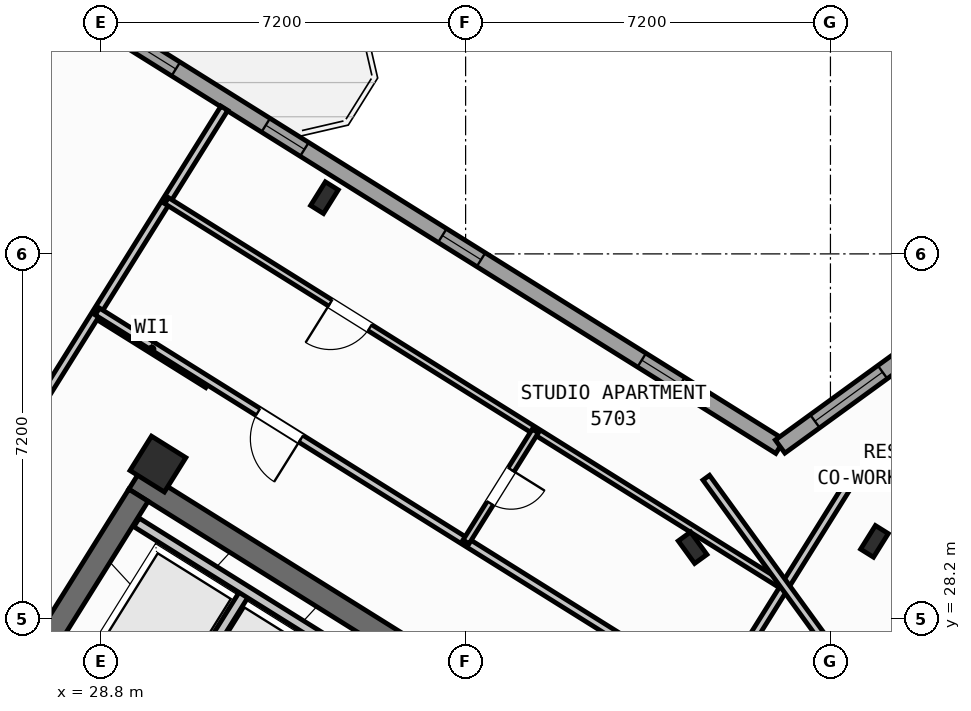
"""IFC4 building model, lengths in metres.
Left out: names, types, materials, properties, quantities, classifications, styles, units other than length and angle.
Written with IfcOpenShell. Run it as: python <this file> out.ifc"""

import sys

from ifc_helpers import new_model, si_unit, direction, frame, frame_2d, origin, origin_2d, place, context, subcontext, project, spatial, rectangle, hollow_rectangle, i_section, extrude, source, transform, mapped, element, fill, save


model = new_model("IFC4")
c1 = context("Model", 3, precision=1e-05, world=origin(), true_north=direction((0.0, 1.0)))
c2 = subcontext(c1, "Body", "Model", "MODEL_VIEW")
j1 = project(units=[si_unit("LENGTHUNIT", "METRE"), si_unit("PLANEANGLEUNIT", "RADIAN")], contexts=[c1])
p1 = place(None, origin())
s1 = spatial("IfcSite", under=j1, at=p1, CompositionType="ELEMENT")
p2 = place(p1, origin())
s2 = spatial("IfcBuilding", under=s1, at=p2, CompositionType="ELEMENT")
p3 = place(p2, frame((0.0, 0.0, 225.6)))
s3 = spatial("IfcBuildingStorey", under=s2, at=p3, CompositionType="ELEMENT", Elevation=225.6)
p4 = place(p3, frame((40.531, 24.036, 0.0), z_axis=(0.0, 0.0, 1.0), x_axis=(-0.848048787466, 0.529918157905, 0.0)))
e1 = element("IfcWall", 1, at=p4, inside=s3, PredefinedType="SHEAR", context=c2, shape_type="SweptSolid", body=[
    extrude(rectangle(XDim=13.04, YDim=0.45, at=frame_2d((6.52, 0.0))), origin(), (0.0, 0.0, 1.0), 3.35),
])
p5 = place(p3, frame((29.544, 30.636, 0.0), z_axis=(0.0, 0.0, 1.0), x_axis=(-0.529902075036, -0.848058836916, 0.0)))
e2 = element("IfcWall", 2, at=p5, inside=s3, PredefinedType="SHEAR", context=c2, shape_type="SweptSolid", body=[
    extrude(rectangle(XDim=3.625, YDim=0.45, at=frame_2d((1.812, 0.0))), origin(), (0.0, 0.0, 1.0), 3.35),
])
p6 = place(p3, frame((44.406, 24.172, 0.0), z_axis=(0.0, 0.0, 1.0), x_axis=(0.809012867805, 0.587790931986, 0.0)))
e3 = element("IfcWall", 3, at=p6, inside=s3, PredefinedType="SHEAR", context=c2, shape_type="SweptSolid", body=[
    extrude(rectangle(XDim=12.24, YDim=0.45, at=frame_2d((6.12, 0.0))), origin(), (0.0, 0.0, 1.0), 3.35),
])
m1 = source(origin(), c2, "Body", "SweptSolid", [
    extrude(i_section(OverallWidth=0.3, OverallDepth=0.55, WebThickness=0.015, FlangeThickness=0.029, at=origin_2d()), origin(), (0.0, 0.0, 1.0), 3.6),
])
for number, where, z_axis, x_axis in (
    (4, (44.068, 29.726, 0.0), (0.0, 0.0, 1.0), (-0.848, 0.53, 0.0)),
    (5, (33.213, 36.509, 0.0), (0.0, 0.0, 1.0), (-0.848, 0.53, 0.0)),
):
    element("IfcColumn", number, at=place(p3, frame(where, z_axis=z_axis, x_axis=x_axis)), inside=s3, PredefinedType="COLUMN", context=c2, shape_type="MappedRepresentation", body=[
        mapped(m1, transform((0.0, 0.0, 0.0), scale=1.0)),
    ])
m2 = source(origin(), c2, "Body", "SweptSolid", [
    extrude(hollow_rectangle(XDim=0.8, YDim=0.8, WallThickness=0.032, at=origin_2d()), origin(), (0.0, 0.0, 1.0), 3.6),
])
p7 = place(p3, frame((29.928, 31.251, 0.0), z_axis=(0.0, 0.0, 1.0), x_axis=(-0.848048096156, 0.529919264233, 0.0)))
e6 = element("IfcColumn", 6, at=p7, inside=s3, PredefinedType="COLUMN", context=c2, shape_type="MappedRepresentation", body=[
    mapped(m2, transform((0.0, 0.0, 0.0), scale=1.0)),
])
p8 = place(p3, frame((40.479, 29.601, 0.0), z_axis=(0.0, 0.0, 1.0), x_axis=(0.809016994375, 0.587785252292, 0.0)))
e7 = element("IfcColumn", 7, at=p8, inside=s3, PredefinedType="COLUMN", context=c2, shape_type="MappedRepresentation", body=[
    mapped(m1, transform((0.0, 0.0, 0.0), scale=1.0)),
])
p9 = place(p3, frame((31.76, 12.183, 0.0), z_axis=(0.0, 0.0, 1.0), x_axis=(-0.848047074256, 0.529920899612, 0.0)))
e8 = element("IfcWall", 8, at=p9, inside=s3, PredefinedType="STANDARD", context=c2, shape_type="SweptSolid", body=[
    extrude(rectangle(XDim=30.652, YDim=0.32, at=frame_2d((15.326, 0.0))), origin(), (0.0, 0.0, 1.0), 3.35),
])
p10 = place(p9, frame((15.166, 0.0, 0.0)))
e9 = element("IfcOpeningElement", 9, at=p10, cuts=e8, PredefinedType="OPENING", context=c2, shape_type="SweptSolid", body=[
    extrude(rectangle(XDim=1.2, YDim=2.15, at=frame_2d((0.6, 1.075))), frame((0.0, 0.17, 0.0), z_axis=(0.0, -1.0, 0.0), x_axis=(1.0, 0.0, 0.0)), (0.0, 0.0, 1.0), 0.34),
])
p11 = place(p9, frame((2.24, 0.0, 0.9)))
e10 = element("IfcOpeningElement", 10, at=p11, cuts=e8, PredefinedType="OPENING", context=c2, shape_type="SweptSolid", body=[
    extrude(rectangle(XDim=1.65, YDim=1.45, at=frame_2d((0.825, 0.725))), frame((0.0, 0.17, 0.0), z_axis=(0.0, -1.0, 0.0), x_axis=(1.0, 0.0, 0.0)), (0.0, 0.0, 1.0), 0.34),
])
p12 = place(p9, frame((7.469, 0.0, 0.9)))
e11 = element("IfcOpeningElement", 11, at=p12, cuts=e8, PredefinedType="OPENING", context=c2, shape_type="SweptSolid", body=[
    extrude(rectangle(XDim=1.65, YDim=1.45, at=frame_2d((0.825, 0.725))), frame((0.0, 0.17, 0.0), z_axis=(0.0, -1.0, 0.0), x_axis=(1.0, 0.0, 0.0)), (0.0, 0.0, 1.0), 0.34),
])
p13 = place(p9, frame((12.623, 0.0, 1.0)))
e12 = element("IfcOpeningElement", 12, at=p13, cuts=e8, PredefinedType="OPENING", context=c2, shape_type="SweptSolid", body=[
    extrude(rectangle(XDim=0.9, YDim=1.25, at=frame_2d((0.45, 0.625))), frame((0.0, 0.17, 0.0), z_axis=(0.0, -1.0, 0.0), x_axis=(1.0, 0.0, 0.0)), (0.0, 0.0, 1.0), 0.34),
])
p14 = place(p9, frame((19.556, 0.0, 1.0)))
e13 = element("IfcOpeningElement", 13, at=p14, cuts=e8, PredefinedType="OPENING", context=c2, shape_type="SweptSolid", body=[
    extrude(rectangle(XDim=0.9, YDim=1.25, at=frame_2d((0.45, 0.625))), frame((0.0, 0.17, 0.0), z_axis=(0.0, -1.0, 0.0), x_axis=(1.0, 0.0, 0.0)), (0.0, 0.0, 1.0), 0.34),
])
p15 = place(p9, frame((21.95, 0.0, 1.0)))
e14 = element("IfcOpeningElement", 14, at=p15, cuts=e8, PredefinedType="OPENING", context=c2, shape_type="SweptSolid", body=[
    extrude(rectangle(XDim=0.9, YDim=1.25, at=frame_2d((0.45, 0.625))), frame((0.0, 0.17, 0.0), z_axis=(0.0, -1.0, 0.0), x_axis=(1.0, 0.0, 0.0)), (0.0, 0.0, 1.0), 0.34),
])
p16 = place(p9, frame((26.983, 0.0, 0.9)))
e15 = element("IfcOpeningElement", 15, at=p16, cuts=e8, PredefinedType="OPENING", context=c2, shape_type="SweptSolid", body=[
    extrude(rectangle(XDim=1.35, YDim=1.45, at=frame_2d((0.675, 0.725))), frame((0.0, 0.17, 0.0), z_axis=(0.0, -1.0, 0.0), x_axis=(1.0, 0.0, 0.0)), (0.0, 0.0, 1.0), 0.34),
])
p17 = place(p3, frame((17.424, 47.083, 0.0), z_axis=(0.0, 0.0, 1.0), x_axis=(0.848049927979, -0.529916332693, 0.0)))
e16 = element("IfcWall", 16, at=p17, inside=s3, PredefinedType="STANDARD", context=c2, shape_type="SweptSolid", body=[
    extrude(rectangle(XDim=29.223, YDim=0.32, at=frame_2d((14.612, 0.0))), origin(), (0.0, 0.0, 1.0), 3.35),
])
p18 = place(p17, frame((3.709, 0.0, 0.0)))
e17 = element("IfcOpeningElement", 17, at=p18, cuts=e16, PredefinedType="OPENING", context=c2, shape_type="SweptSolid", body=[
    extrude(rectangle(XDim=1.05, YDim=2.15, at=frame_2d((0.525, 1.075))), frame((0.0, 0.17, 0.0), z_axis=(0.0, -1.0, 0.0), x_axis=(1.0, 0.0, 0.0)), (0.0, 0.0, 1.0), 0.34),
])
p19 = place(p17, frame((0.809, 0.0, 1.0)))
e18 = element("IfcOpeningElement", 18, at=p19, cuts=e16, PredefinedType="OPENING", context=c2, shape_type="SweptSolid", body=[
    extrude(rectangle(XDim=0.9, YDim=1.25, at=frame_2d((0.45, 0.625))), frame((0.0, 0.17, 0.0), z_axis=(0.0, -1.0, 0.0), x_axis=(1.0, 0.0, 0.0)), (0.0, 0.0, 1.0), 0.34),
])
p20 = place(p17, frame((13.811, 0.0, 0.9)))
e19 = element("IfcOpeningElement", 19, at=p20, cuts=e16, PredefinedType="OPENING", context=c2, shape_type="SweptSolid", body=[
    extrude(rectangle(XDim=1.35, YDim=1.45, at=frame_2d((0.675, 0.725))), frame((0.0, 0.17, 0.0), z_axis=(0.0, -1.0, 0.0), x_axis=(1.0, 0.0, 0.0)), (0.0, 0.0, 1.0), 0.34),
])
p21 = place(p17, frame((17.254, 0.0, 1.0)))
e20 = element("IfcOpeningElement", 20, at=p21, cuts=e16, PredefinedType="OPENING", context=c2, shape_type="SweptSolid", body=[
    extrude(rectangle(XDim=0.9, YDim=1.25, at=frame_2d((0.45, 0.625))), frame((0.0, 0.17, 0.0), z_axis=(0.0, -1.0, 0.0), x_axis=(1.0, 0.0, 0.0)), (0.0, 0.0, 1.0), 0.34),
])
p22 = place(p17, frame((21.364, 0.0, 1.0)))
e21 = element("IfcOpeningElement", 21, at=p22, cuts=e16, PredefinedType="OPENING", context=c2, shape_type="SweptSolid", body=[
    extrude(rectangle(XDim=0.9, YDim=1.25, at=frame_2d((0.45, 0.625))), frame((0.0, 0.17, 0.0), z_axis=(0.0, -1.0, 0.0), x_axis=(1.0, 0.0, 0.0)), (0.0, 0.0, 1.0), 0.34),
])
p23 = place(p17, frame((26.003, 0.0, 1.0)))
e22 = element("IfcOpeningElement", 22, at=p23, cuts=e16, PredefinedType="OPENING", context=c2, shape_type="SweptSolid", body=[
    extrude(rectangle(XDim=0.9, YDim=1.25, at=frame_2d((0.45, 0.625))), frame((0.0, 0.17, 0.0), z_axis=(0.0, -1.0, 0.0), x_axis=(1.0, 0.0, 0.0)), (0.0, 0.0, 1.0), 0.34),
])
p24 = place(p17, frame((11.211, 0.0, 1.0)))
e23 = element("IfcOpeningElement", 23, at=p24, cuts=e16, PredefinedType="OPENING", context=c2, shape_type="SweptSolid", body=[
    extrude(rectangle(XDim=0.65, YDim=1.15, at=frame_2d((0.325, 0.575))), frame((0.0, 0.17, 0.0), z_axis=(0.0, -1.0, 0.0), x_axis=(1.0, 0.0, 0.0)), (0.0, 0.0, 1.0), 0.34),
])
p25 = place(p17, frame((9.079, 0.0, 1.0)))
e24 = element("IfcOpeningElement", 24, at=p25, cuts=e16, PredefinedType="OPENING", context=c2, shape_type="SweptSolid", body=[
    extrude(rectangle(XDim=0.65, YDim=1.15, at=frame_2d((0.325, 0.575))), frame((0.0, 0.17, 0.0), z_axis=(0.0, -1.0, 0.0), x_axis=(1.0, 0.0, 0.0)), (0.0, 0.0, 1.0), 0.34),
])
p26 = place(p17, frame((6.951, 0.0, 1.0)))
e25 = element("IfcOpeningElement", 25, at=p26, cuts=e16, PredefinedType="OPENING", context=c2, shape_type="SweptSolid", body=[
    extrude(rectangle(XDim=0.65, YDim=1.15, at=frame_2d((0.325, 0.575))), frame((0.0, 0.17, 0.0), z_axis=(0.0, -1.0, 0.0), x_axis=(1.0, 0.0, 0.0)), (0.0, 0.0, 1.0), 0.34),
])
p27 = place(p3, frame((42.207, 31.597, 0.0), z_axis=(0.0, 0.0, 1.0), x_axis=(0.809020333377, 0.587780656523, 0.0)))
e26 = element("IfcWall", 26, at=p27, inside=s3, PredefinedType="STANDARD", context=c2, shape_type="SweptSolid", body=[
    extrude(rectangle(XDim=15.223, YDim=0.32, at=frame_2d((7.611, 0.0))), origin(), (0.0, 0.0, 1.0), 3.35),
])
p28 = place(p27, frame((12.82, 0.0, 0.0)))
e27 = element("IfcOpeningElement", 27, at=p28, cuts=e26, PredefinedType="OPENING", context=c2, shape_type="SweptSolid", body=[
    extrude(rectangle(XDim=1.05, YDim=2.15, at=frame_2d((0.525, 1.075))), frame((0.0, 0.17, 0.0), z_axis=(0.0, -1.0, 0.0), x_axis=(1.0, 0.0, 0.0)), (0.0, 0.0, 1.0), 0.34),
])
p29 = place(p27, frame((0.85, 0.0, 0.9)))
e28 = element("IfcOpeningElement", 28, at=p29, cuts=e26, PredefinedType="OPENING", context=c2, shape_type="SweptSolid", body=[
    extrude(rectangle(XDim=1.65, YDim=1.45, at=frame_2d((0.825, 0.725))), frame((0.0, 0.17, 0.0), z_axis=(0.0, -1.0, 0.0), x_axis=(1.0, 0.0, 0.0)), (0.0, 0.0, 1.0), 0.34),
])
p30 = place(p27, frame((5.769, 0.0, 0.9)))
e29 = element("IfcOpeningElement", 29, at=p30, cuts=e26, PredefinedType="OPENING", context=c2, shape_type="SweptSolid", body=[
    extrude(rectangle(XDim=1.35, YDim=1.45, at=frame_2d((0.675, 0.725))), frame((0.0, 0.17, 0.0), z_axis=(0.0, -1.0, 0.0), x_axis=(1.0, 0.0, 0.0)), (0.0, 0.0, 1.0), 0.34),
])
p31 = place(p27, frame((10.219, 0.0, 1.0)))
e30 = element("IfcOpeningElement", 30, at=p31, cuts=e26, PredefinedType="OPENING", context=c2, shape_type="SweptSolid", body=[
    extrude(rectangle(XDim=0.9, YDim=1.25, at=frame_2d((0.45, 0.625))), frame((0.0, 0.17, 0.0), z_axis=(0.0, -1.0, 0.0), x_axis=(1.0, 0.0, 0.0)), (0.0, 0.0, 1.0), 0.34),
])
p32 = place(p3, frame((31.645, 28.716, 0.0), z_axis=(0.0, 0.0, 1.0), x_axis=(-0.52986693015, -0.848080795876, 0.0)))
e31 = element("IfcWall", 31, at=p32, inside=s3, PredefinedType="STANDARD", context=c2, shape_type="SweptSolid", body=[
    extrude(rectangle(XDim=2.66, YDim=0.2, at=frame_2d((1.33, 0.0))), origin(), (0.0, 0.0, 1.0), 3.34),
])
p33 = place(p3, frame((33.363, 27.69, 0.0), z_axis=(0.0, 0.0, 1.0), x_axis=(-0.84804957148, 0.529916903215, 0.0)))
e32 = element("IfcWall", 32, at=p33, inside=s3, PredefinedType="STANDARD", context=c2, shape_type="SweptSolid", body=[
    extrude(rectangle(XDim=4.548, YDim=0.2, at=frame_2d((2.274, 0.0))), origin(), (0.0, 0.0, 1.0), 3.34),
])
p34 = place(p3, frame((30.914, 32.829, 0.0), z_axis=(0.0, 0.0, 1.0), x_axis=(-0.848008813643, 0.529982124211, 0.0)))
e33 = element("IfcWall", 33, at=p34, inside=s3, PredefinedType="PARTITIONING", context=c2, shape_type="SweptSolid", body=[
    extrude(rectangle(XDim=2.61, YDim=0.16, at=frame_2d((1.305, 0.0))), origin(), (0.0, 0.0, 1.0), 3.34),
])
p35 = place(p3, frame((31.239, 38.274, 0.0), z_axis=(0.0, 0.0, 1.0), x_axis=(-0.529921796515, -0.848046513806, 0.0)))
e34 = element("IfcWall", 34, at=p35, inside=s3, PredefinedType="PARTITIONING", context=c2, shape_type="SweptSolid", body=[
    extrude(rectangle(XDim=16.5, YDim=0.16, at=frame_2d((8.25, 0.0))), origin(), (0.0, 0.0, 1.0), 3.34),
])
p36 = place(p3, frame((41.936, 26.012, 0.0), z_axis=(0.0, 0.0, 1.0), x_axis=(-0.848051154596, 0.529914369676, 0.0)))
e35 = element("IfcWall", 35, at=p36, inside=s3, PredefinedType="PARTITIONING", context=c2, shape_type="SweptSolid", body=[
    extrude(rectangle(XDim=15.57, YDim=0.16, at=frame_2d((7.785, 0.0))), origin(), (0.0, 0.0, 1.0), 3.34),
])
p37 = place(p36, frame((10.83, 0.0, 0.0)))
e36 = element("IfcOpeningElement", 36, at=p37, cuts=e35, PredefinedType="OPENING", context=c2, shape_type="SweptSolid", body=[
    extrude(rectangle(XDim=1.0, YDim=2.1, at=frame_2d((0.5, 1.05))), frame((0.0, 0.09, 0.0), z_axis=(0.0, -1.0, 0.0), x_axis=(1.0, 0.0, 0.0)), (0.0, 0.0, 1.0), 0.18),
])
p38 = place(p3, frame((43.704, 31.086, 0.0), z_axis=(0.0, 0.0, 1.0), x_axis=(-0.529906828443, -0.848055866774, 0.0)))
e37 = element("IfcWall", 37, at=p38, inside=s3, PredefinedType="PARTITIONING", context=c2, shape_type="SweptSolid", body=[
    extrude(rectangle(XDim=5.48, YDim=0.16, at=frame_2d((2.74, 0.0))), origin(), (0.0, 0.0, 1.0), 3.34),
])
p39 = place(p3, frame((42.226, 28.873, 0.0), z_axis=(0.0, 0.0, 1.0), x_axis=(-0.848049134363, 0.529917602752, 0.0)))
e38 = element("IfcWall", 38, at=p39, inside=s3, PredefinedType="PLUMBINGWALL", context=c2, shape_type="SweptSolid", body=[
    extrude(rectangle(XDim=14.3, YDim=0.14, at=frame_2d((7.15, 0.0))), origin(), (0.0, 0.0, 1.0), 3.34),
])
p40 = place(p39, frame((9.57, 0.0, 0.0)))
e39 = element("IfcOpeningElement", 39, at=p40, cuts=e38, PredefinedType="OPENING", context=c2, shape_type="SweptSolid", body=[
    extrude(rectangle(XDim=0.92, YDim=2.08, at=frame_2d((0.46, 1.04))), frame((0.0, 0.08, 0.0), z_axis=(0.0, -1.0, 0.0), x_axis=(1.0, 0.0, 0.0)), (0.0, 0.0, 1.0), 0.16),
])
p41 = place(p3, frame((37.375, 31.904, 0.0), z_axis=(0.0, 0.0, 1.0), x_axis=(-0.529913878929, -0.848051461244, 0.0)))
e40 = element("IfcWall", 40, at=p41, inside=s3, PredefinedType="PLUMBINGWALL", context=c2, shape_type="SweptSolid", body=[
    extrude(rectangle(XDim=2.58, YDim=0.14, at=frame_2d((1.29, 0.0))), origin(), (0.0, 0.0, 1.0), 3.34),
])
p42 = place(p41, frame((0.9, 0.0, 0.0)))
e41 = element("IfcOpeningElement", 41, at=p42, cuts=e40, PredefinedType="OPENING", context=c2, shape_type="SweptSolid", body=[
    extrude(rectangle(XDim=0.78, YDim=2.05, at=frame_2d((0.39, 1.025))), frame((0.0, 0.08, 0.0), z_axis=(0.0, -1.0, 0.0), x_axis=(1.0, 0.0, 0.0)), (0.0, 0.0, 1.0), 0.16),
])
p43 = place(p3, frame((42.866, 26.044, 0.0), z_axis=(0.0, 0.0, 1.0), x_axis=(0.809020254154, 0.587780765566, 0.0)))
e42 = element("IfcWall", 42, at=p43, inside=s3, PredefinedType="PARTITIONING", context=c2, shape_type="SweptSolid", body=[
    extrude(rectangle(XDim=14.67, YDim=0.16, at=frame_2d((7.335, 0.0))), origin(), (0.0, 0.0, 1.0), 3.34),
])
p44 = place(p43, frame((3.215, 0.0, 0.0)))
e43 = element("IfcOpeningElement", 43, at=p44, cuts=e42, PredefinedType="OPENING", context=c2, shape_type="SweptSolid", body=[
    extrude(rectangle(XDim=1.0, YDim=2.1, at=frame_2d((0.5, 1.05))), frame((0.0, 0.09, 0.0), z_axis=(0.0, -1.0, 0.0), x_axis=(1.0, 0.0, 0.0)), (0.0, 0.0, 1.0), 0.18),
])
p45 = place(p43, frame((9.915, 0.0, 0.0)))
e44 = element("IfcOpeningElement", 44, at=p45, cuts=e42, PredefinedType="OPENING", context=c2, shape_type="SweptSolid", body=[
    extrude(rectangle(XDim=1.0, YDim=2.1, at=frame_2d((0.5, 1.05))), frame((0.0, 0.09, 0.0), z_axis=(0.0, -1.0, 0.0), x_axis=(1.0, 0.0, 0.0)), (0.0, 0.0, 1.0), 0.18),
])
p46 = place(p3, frame((43.969, 26.55, 0.0), z_axis=(0.0, 0.0, 1.0), x_axis=(-0.587776919386, 0.80902304852, 0.0)))
e45 = element("IfcWall", 45, at=p46, inside=s3, PredefinedType="PARTITIONING", context=c2, shape_type="SweptSolid", body=[
    extrude(rectangle(XDim=5.48, YDim=0.16, at=frame_2d((2.74, 0.0))), origin(), (0.0, 0.0, 1.0), 3.34),
])
m3 = source(origin(), c2, "Body", "SweptSolid", [
    extrude(rectangle(XDim=1.35, YDim=1.45, at=frame_2d((0.675, 0.725))), frame((0.0, 0.03, 0.0), z_axis=(0.0, -1.0, 0.0), x_axis=(1.0, 0.0, 0.0)), (0.0, 0.0, 1.0), 0.06),
])
p47 = place(p20, origin())
e46 = element("IfcWindow", 46, at=p47, inside=s3, PartitioningType="SINGLE_PANEL", PredefinedType="WINDOW", context=c2, shape_type="MappedRepresentation", body=[
    mapped(m3, transform((0.0, 0.0, 0.0), scale=1.0)),
])
fill(e19, e46)
m4 = source(origin(), c2, "Body", "SweptSolid", [
    extrude(rectangle(XDim=0.9, YDim=1.25, at=frame_2d((0.45, 0.625))), frame((0.0, 0.03, 0.0), z_axis=(0.0, -1.0, 0.0), x_axis=(1.0, 0.0, 0.0)), (0.0, 0.0, 1.0), 0.06),
])
p48 = place(p21, origin())
e47 = element("IfcWindow", 47, at=p48, inside=s3, PartitioningType="SINGLE_PANEL", PredefinedType="WINDOW", context=c2, shape_type="MappedRepresentation", body=[
    mapped(m4, transform((0.0, 0.0, 0.0), scale=1.0)),
])
fill(e20, e47)
p49 = place(p22, origin())
e48 = element("IfcWindow", 48, at=p49, inside=s3, PartitioningType="SINGLE_PANEL", PredefinedType="WINDOW", context=c2, shape_type="MappedRepresentation", body=[
    mapped(m4, transform((0.0, 0.0, 0.0), scale=1.0)),
])
fill(e21, e48)
p50 = place(p23, origin())
e49 = element("IfcWindow", 49, at=p50, inside=s3, PartitioningType="SINGLE_PANEL", PredefinedType="WINDOW", context=c2, shape_type="MappedRepresentation", body=[
    mapped(m4, transform((0.0, 0.0, 0.0), scale=1.0)),
])
fill(e22, e49)
m5 = source(origin(), c2, "Body", "SweptSolid", [
    extrude(rectangle(XDim=1.65, YDim=1.45, at=frame_2d((0.825, 0.725))), frame((0.0, 0.03, 0.0), z_axis=(0.0, -1.0, 0.0), x_axis=(1.0, 0.0, 0.0)), (0.0, 0.0, 1.0), 0.06),
])
p51 = place(p29, origin())
e50 = element("IfcWindow", 50, at=p51, inside=s3, PartitioningType="SINGLE_PANEL", PredefinedType="WINDOW", context=c2, shape_type="MappedRepresentation", body=[
    mapped(m5, transform((0.0, 0.0, 0.0), scale=1.0)),
])
fill(e28, e50)
m6 = source(origin(), c2, "Body", "SweptSolid", [
    extrude(rectangle(XDim=1.0, YDim=2.1, at=frame_2d((0.5, 1.05))), frame((0.0, 0.025, 0.0), z_axis=(0.0, -1.0, 0.0), x_axis=(1.0, 0.0, 0.0)), (0.0, 0.0, 1.0), 0.05),
])
p52 = place(p37, origin())
e51 = element("IfcDoor", 51, at=p52, inside=s3, OperationType="SINGLE_SWING_LEFT", PredefinedType="DOOR", context=c2, shape_type="MappedRepresentation", body=[
    mapped(m6, transform((0.0, 0.0, 0.0), scale=1.0)),
])
fill(e36, e51)
m7 = source(origin(), c2, "Body", "SweptSolid", [
    extrude(rectangle(XDim=0.92, YDim=2.08, at=frame_2d((0.46, 1.04))), frame((0.0, 0.025, 0.0), z_axis=(0.0, -1.0, 0.0), x_axis=(1.0, 0.0, 0.0)), (0.0, 0.0, 1.0), 0.05),
])
p53 = place(p40, origin())
e52 = element("IfcDoor", 52, at=p53, inside=s3, OperationType="SINGLE_SWING_RIGHT", PredefinedType="DOOR", context=c2, shape_type="MappedRepresentation", body=[
    mapped(m7, transform((0.0, 0.0, 0.0), scale=1.0)),
])
fill(e39, e52)
m8 = source(origin(), c2, "Body", "SweptSolid", [
    extrude(rectangle(XDim=0.78, YDim=2.05, at=frame_2d((0.39, 1.025))), frame((0.0, 0.025, 0.0), z_axis=(0.0, -1.0, 0.0), x_axis=(1.0, 0.0, 0.0)), (0.0, 0.0, 1.0), 0.05),
])
p54 = place(p42, origin())
e53 = element("IfcDoor", 53, at=p54, inside=s3, OperationType="SINGLE_SWING_LEFT", PredefinedType="DOOR", context=c2, shape_type="MappedRepresentation", body=[
    mapped(m8, transform((0.0, 0.0, 0.0), scale=1.0)),
])
fill(e41, e53)
save(model, sys.argv[1])
